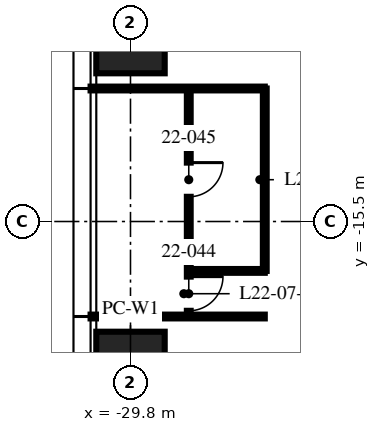
"""IFC4 building model, lengths in metres.
Left out: names, types, materials, properties, quantities, classifications, styles, units other than length and angle.
Written with IfcOpenShell. Run it as: python <this file> out.ifc"""

import sys

from ifc_helpers import new_model, si_unit, direction, frame, frame_2d, origin, origin_2d, place, context, subcontext, project, spatial, rectangle, hollow_rectangle, extrude, element, fill, save


model = new_model("IFC4")
c1 = context("Model", 3, precision=1e-05, world=origin(), true_north=direction((0.0, 1.0)))
c2 = subcontext(c1, "Body", "Model", "MODEL_VIEW")
j1 = project(units=[si_unit("LENGTHUNIT", "METRE"), si_unit("PLANEANGLEUNIT", "RADIAN")], contexts=[c1])
p1 = place(None, origin())
s1 = spatial("IfcSite", under=j1, at=p1, CompositionType="ELEMENT")
p2 = place(p1, origin())
s2 = spatial("IfcBuilding", under=s1, at=p2, CompositionType="ELEMENT")
p3 = place(p2, frame((0.0, 0.0, 88.5)))
s3 = spatial("IfcBuildingStorey", under=s2, at=p3, CompositionType="ELEMENT", Elevation=88.5)
for number, where, z_axis, x_axis in (
    (1, (-29.8, -20.0, 0.0), (0.0, 0.0, 1.0), (0.0, 1.0, 0.0)),
    (2, (-29.8, -10.0, 0.0), (0.0, 0.0, 1.0), (0.0, 1.0, 0.0)),
):
    element("IfcColumn", number, at=place(p3, frame(where, z_axis=z_axis, x_axis=x_axis)), inside=s3, PredefinedType="COLUMN", context=c2, shape_type="SweptSolid", body=[
        extrude(hollow_rectangle(XDim=3.2, YDim=1.8, WallThickness=0.2, at=origin_2d()), origin(), (0.0, 0.0, 1.0), 3.75),
    ])
for number, where, z_axis, x_axis in (
    (3, (-26.267, -12.0, 0.0), (0.0, 0.0, 1.0), (-1.0, 0.0, 0.0)),
    (4, (-26.267, -18.0, 0.0), (0.0, 0.0, 1.0), (-1.0, 0.0, 0.0)),
):
    element("IfcWall", number, at=place(p3, frame(where, z_axis=z_axis, x_axis=x_axis)), inside=s3, PredefinedType="PARTITIONING", context=c2, shape_type="SweptSolid", body=[
        extrude(rectangle(XDim=4.583, YDim=0.1, at=frame_2d((2.292, 0.0))), origin(), (0.0, 0.0, 1.0), 2.71),
    ])
p4 = place(p3, frame((-28.267, -12.0, 0.0), z_axis=(0.0, 0.0, 1.0), x_axis=(0.0, -1.0, 0.0)))
e5 = element("IfcWall", 5, at=p4, inside=s3, PredefinedType="PARTITIONING", context=c2, shape_type="SweptSolid", body=[
    extrude(rectangle(XDim=6.0, YDim=0.1, at=frame_2d((3.0, 0.0))), origin(), (0.0, 0.0, 1.0), 2.61),
])
p5 = place(p4, frame((4.95, 0.0, 0.0)))
e6 = element("IfcOpeningElement", 6, at=p5, cuts=e5, PredefinedType="OPENING", context=c2, shape_type="SweptSolid", body=[
    extrude(rectangle(XDim=0.9, YDim=2.1, at=frame_2d((0.45, 1.05))), frame((0.0, 0.06, 0.0), z_axis=(0.0, -1.0, 0.0), x_axis=(1.0, 0.0, 0.0)), (0.0, 0.0, 1.0), 0.12),
])
p6 = place(p4, frame((1.95, 0.0, 0.0)))
e7 = element("IfcOpeningElement", 7, at=p6, cuts=e5, PredefinedType="OPENING", context=c2, shape_type="SweptSolid", body=[
    extrude(rectangle(XDim=0.9, YDim=2.1, at=frame_2d((0.45, 1.05))), frame((0.0, 0.06, 0.0), z_axis=(0.0, -1.0, 0.0), x_axis=(1.0, 0.0, 0.0)), (0.0, 0.0, 1.0), 0.12),
])
p7 = place(p3, frame((-26.267, -16.8, 0.0), z_axis=(0.0, 0.0, 1.0), x_axis=(-1.0, 0.0, 0.0)))
e8 = element("IfcWall", 8, at=p7, inside=s3, PredefinedType="PARTITIONING", context=c2, shape_type="SweptSolid", body=[
    extrude(rectangle(XDim=2.0, YDim=0.1, at=frame_2d((1.0, 0.0))), origin(), (0.0, 0.0, 1.0), 3.5),
])
p8 = place(p3, frame((-26.267, -12.0, 0.0), z_axis=(0.0, 0.0, 1.0), x_axis=(0.0, -1.0, 0.0)))
e9 = element("IfcWall", 9, at=p8, inside=s3, PredefinedType="PARTITIONING", context=c2, shape_type="SweptSolid", body=[
    extrude(rectangle(XDim=4.8, YDim=0.1, at=frame_2d((2.4, 0.0))), origin(), (0.0, 0.0, 1.0), 2.61),
])
p9 = place(p5, origin())
e10 = element("IfcDoor", 10, at=p9, inside=s3, OperationType="SINGLE_SWING_LEFT", PredefinedType="DOOR", context=c2, shape_type="SweptSolid", body=[
    extrude(rectangle(XDim=0.9, YDim=2.1, at=frame_2d((0.45, 1.05))), frame((0.0, 0.025, 0.0), z_axis=(0.0, -1.0, 0.0), x_axis=(1.0, 0.0, 0.0)), (0.0, 0.0, 1.0), 0.05),
])
fill(e6, e10)
p10 = place(p6, origin())
e11 = element("IfcDoor", 11, at=p10, inside=s3, OperationType="SINGLE_SWING_LEFT", PredefinedType="DOOR", context=c2, shape_type="SweptSolid", body=[
    extrude(rectangle(XDim=0.9, YDim=2.1, at=frame_2d((0.45, 1.05))), frame((0.0, 0.025, 0.0), z_axis=(0.0, -1.0, 0.0), x_axis=(1.0, 0.0, 0.0)), (0.0, 0.0, 1.0), 0.05),
])
fill(e7, e11)
save(model, sys.argv[1])
